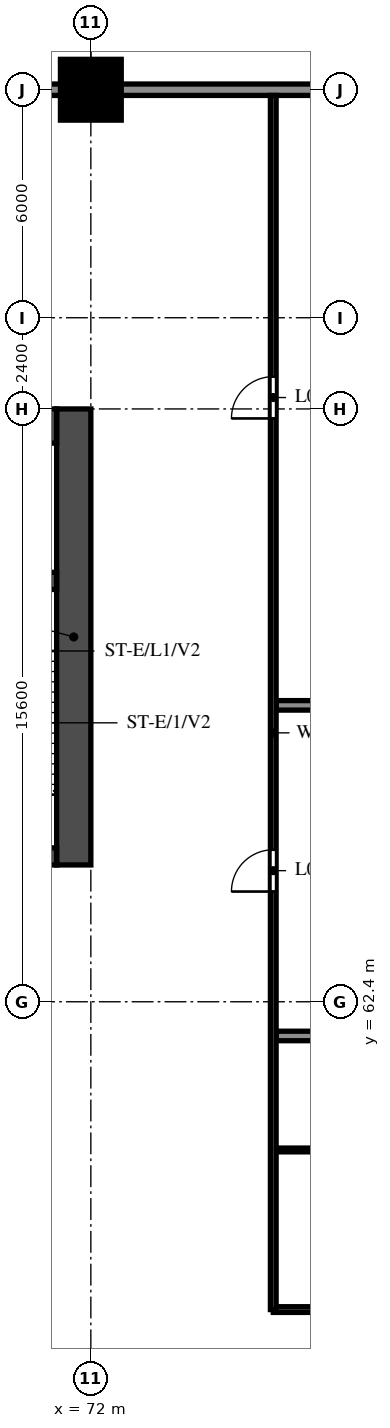
"""IFC4 building model, lengths in metres.
Left out: names, types, materials, properties, quantities, classifications, styles, units other than length and angle.
Written with IfcOpenShell. Run it as: python <this file> out.ifc"""

import sys

from ifc_helpers import new_model, si_unit, direction, frame, frame_2d, origin, origin_2d, place, context, subcontext, project, spatial, rectangle, circle, extrude, source, transform, mapped, element, fill, save


model = new_model("IFC4")
c1 = context("Model", 3, precision=1e-05, world=origin(), true_north=direction((0.0, 1.0)))
c2 = subcontext(c1, "Body", "Model", "MODEL_VIEW")
j1 = project(units=[si_unit("LENGTHUNIT", "METRE"), si_unit("PLANEANGLEUNIT", "RADIAN")], contexts=[c1])
p1 = place(None, origin())
s1 = spatial("IfcSite", under=j1, at=p1, CompositionType="ELEMENT")
p2 = place(p1, origin())
s2 = spatial("IfcBuilding", under=s1, at=p2, CompositionType="ELEMENT")
p3 = place(p2, frame((0.0, 0.0, 7.8)))
s3 = spatial("IfcBuildingStorey", under=s2, at=p3, CompositionType="ELEMENT", Elevation=7.8)
m1 = source(origin(), c2, "Body", "SweptSolid", [
    extrude(circle(Radius=0.8, at=origin_2d()), origin(), (0.0, 0.0, 1.0), 5.0),
])
p4 = place(p3, frame((72.0, 86.4, 0.0), z_axis=(0.0, 0.0, 1.0), x_axis=(1.0, 0.0, 0.0)))
e1 = element("IfcColumn", 1, at=p4, inside=s3, PredefinedType="COLUMN", context=c2, shape_type="MappedRepresentation", body=[
    mapped(m1, transform((0.0, 0.0, 0.0))),
])
p5 = place(p3, frame((71.55, 66.0, 0.0), z_axis=(0.0, 0.0, 1.0), x_axis=(0.0, 1.0, 0.0)))
e2 = element("IfcWall", 2, at=p5, inside=s3, PredefinedType="SHEAR", context=c2, shape_type="SweptSolid", body=[
    extrude(rectangle(XDim=12.0, YDim=0.9, at=frame_2d((6.0, 0.0))), origin(), (0.0, 0.0, 1.0), 5.0),
])
p6 = place(p3, frame((29.7, 77.55, 0.0), z_axis=(0.0, 0.0, 1.0), x_axis=(1.0, 0.0, 0.0)))
e3 = element("IfcWall", 3, at=p6, inside=s3, PredefinedType="SHEAR", context=c2, shape_type="SweptSolid", body=[
    extrude(rectangle(XDim=41.4, YDim=0.9, at=frame_2d((20.7, 0.0))), origin(), (0.0, 0.0, 1.0), 5.0),
])
p7 = place(p3, frame((29.7, 66.225, 0.0), z_axis=(0.0, 0.0, 1.0), x_axis=(1.0, 0.0, 0.0)))
e4 = element("IfcWall", 4, at=p7, inside=s3, PredefinedType="SHEAR", context=c2, shape_type="SweptSolid", body=[
    extrude(rectangle(XDim=41.4, YDim=0.45, at=frame_2d((20.7, 0.0))), origin(), (0.0, 0.0, 1.0), 5.0),
])
p8 = place(p7, frame((0.925, 0.0, 0.0)))
e5 = element("IfcOpeningElement", 5, at=p8, cuts=e4, PredefinedType="OPENING", context=c2, shape_type="SweptSolid", body=[
    extrude(rectangle(XDim=1.1, YDim=2.1, at=frame_2d((0.55, 1.05))), frame((0.0, 0.235, 0.0), z_axis=(0.0, -1.0, 0.0), x_axis=(1.0, 0.0, 0.0)), (0.0, 0.0, 1.0), 0.47),
])
p9 = place(p7, frame((3.738, 0.0, 0.0)))
e6 = element("IfcOpeningElement", 6, at=p9, cuts=e4, PredefinedType="OPENING", context=c2, shape_type="SweptSolid", body=[
    extrude(rectangle(XDim=1.8, YDim=2.1, at=frame_2d((0.9, 1.05))), frame((0.0, 0.235, 0.0), z_axis=(0.0, -1.0, 0.0), x_axis=(1.0, 0.0, 0.0)), (0.0, 0.0, 1.0), 0.47),
])
p10 = place(p3, frame((67.925, 73.475, 0.0), z_axis=(0.0, 0.0, 1.0), x_axis=(1.0, 0.0, 0.0)))
e7 = element("IfcWall", 7, at=p10, inside=s3, PredefinedType="SHEAR", context=c2, shape_type="SweptSolid", body=[
    extrude(rectangle(XDim=3.175, YDim=0.45, at=frame_2d((1.587, 0.0))), origin(), (0.0, 0.0, 1.0), 5.0),
])
p11 = place(p3, frame((76.8, 54.3, 0.0), z_axis=(0.0, 0.0, 1.0), x_axis=(1.0, 0.0, 0.0)))
e8 = element("IfcWall", 8, at=p11, inside=s3, PredefinedType="PARTITIONING", context=c2, shape_type="SweptSolid", body=[
    extrude(rectangle(XDim=19.75, YDim=0.15, at=frame_2d((9.875, 0.0))), origin(), (0.0, 0.0, 1.0), 3.8),
])
p12 = place(p11, frame((6.65, 0.0, 0.0)))
e9 = element("IfcOpeningElement", 9, at=p12, cuts=e8, PredefinedType="OPENING", context=c2, shape_type="SweptSolid", body=[
    extrude(rectangle(XDim=1.1, YDim=2.1, at=frame_2d((0.55, 1.05))), frame((0.0, 0.085, 0.0), z_axis=(0.0, -1.0, 0.0), x_axis=(1.0, 0.0, 0.0)), (0.0, 0.0, 1.0), 0.17),
])
p13 = place(p3, frame((76.875, 58.5, 0.0), z_axis=(0.0, 0.0, 1.0), x_axis=(1.0, 0.0, 0.0)))
e10 = element("IfcWall", 10, at=p13, inside=s3, PredefinedType="PARTITIONING", context=c2, shape_type="SweptSolid", body=[
    extrude(rectangle(XDim=4.675, YDim=0.1, at=frame_2d((2.337, 0.0))), origin(), (0.0, 0.0, 1.0), 3.8),
])
p14 = place(p3, frame((76.875, 61.5, 0.0), z_axis=(0.0, 0.0, 1.0), x_axis=(1.0, 0.0, 0.0)))
e11 = element("IfcWall", 11, at=p14, inside=s3, PredefinedType="SOLIDWALL", context=c2, shape_type="SweptSolid", body=[
    extrude(rectangle(XDim=14.325, YDim=0.25, at=frame_2d((7.163, 0.0))), origin(), (0.0, 0.0, 1.0), 3.8),
])
p15 = place(p3, frame((76.875, 70.2, 0.0), z_axis=(0.0, 0.0, 1.0), x_axis=(1.0, 0.0, 0.0)))
e12 = element("IfcWall", 12, at=p15, inside=s3, PredefinedType="SOLIDWALL", context=c2, shape_type="SweptSolid", body=[
    extrude(rectangle(XDim=23.775, YDim=0.25, at=frame_2d((11.887, 0.0))), origin(), (0.0, 0.0, 1.0), 3.8),
])
p16 = place(p3, frame((0.0, 86.4, 0.0), z_axis=(0.0, 0.0, 1.0), x_axis=(1.0, 0.0, 0.0)))
e13 = element("IfcWall", 13, at=p16, inside=s3, PredefinedType="SOLIDWALL", context=c2, shape_type="SweptSolid", body=[
    extrude(rectangle(XDim=100.8, YDim=0.3, at=frame_2d((50.4, 0.0))), origin(), (0.0, 0.0, 1.0), 5.0),
])
p17 = place(p16, frame((2.4, 0.0, 0.6)))
e14 = element("IfcOpeningElement", 14, at=p17, cuts=e13, PredefinedType="OPENING", context=c2, shape_type="SweptSolid", body=[
    extrude(rectangle(XDim=1.8, YDim=2.4, at=frame_2d((0.9, 1.2))), frame((0.0, 0.16, 0.0), z_axis=(0.0, -1.0, 0.0), x_axis=(1.0, 0.0, 0.0)), (0.0, 0.0, 1.0), 0.32),
])
p18 = place(p16, frame((6.0, 0.0, 0.6)))
e15 = element("IfcOpeningElement", 15, at=p18, cuts=e13, PredefinedType="OPENING", context=c2, shape_type="SweptSolid", body=[
    extrude(rectangle(XDim=1.8, YDim=2.4, at=frame_2d((0.9, 1.2))), frame((0.0, 0.16, 0.0), z_axis=(0.0, -1.0, 0.0), x_axis=(1.0, 0.0, 0.0)), (0.0, 0.0, 1.0), 0.32),
])
p19 = place(p16, frame((9.6, 0.0, 0.6)))
e16 = element("IfcOpeningElement", 16, at=p19, cuts=e13, PredefinedType="OPENING", context=c2, shape_type="SweptSolid", body=[
    extrude(rectangle(XDim=1.8, YDim=2.4, at=frame_2d((0.9, 1.2))), frame((0.0, 0.16, 0.0), z_axis=(0.0, -1.0, 0.0), x_axis=(1.0, 0.0, 0.0)), (0.0, 0.0, 1.0), 0.32),
])
p20 = place(p16, frame((16.8, 0.0, 0.6)))
e17 = element("IfcOpeningElement", 17, at=p20, cuts=e13, PredefinedType="OPENING", context=c2, shape_type="SweptSolid", body=[
    extrude(rectangle(XDim=1.8, YDim=2.4, at=frame_2d((0.9, 1.2))), frame((0.0, 0.16, 0.0), z_axis=(0.0, -1.0, 0.0), x_axis=(1.0, 0.0, 0.0)), (0.0, 0.0, 1.0), 0.32),
])
p21 = place(p16, frame((20.4, 0.0, 0.6)))
e18 = element("IfcOpeningElement", 18, at=p21, cuts=e13, PredefinedType="OPENING", context=c2, shape_type="SweptSolid", body=[
    extrude(rectangle(XDim=1.8, YDim=2.4, at=frame_2d((0.9, 1.2))), frame((0.0, 0.16, 0.0), z_axis=(0.0, -1.0, 0.0), x_axis=(1.0, 0.0, 0.0)), (0.0, 0.0, 1.0), 0.32),
])
p22 = place(p16, frame((78.0, 0.0, 0.6)))
e19 = element("IfcOpeningElement", 19, at=p22, cuts=e13, PredefinedType="OPENING", context=c2, shape_type="SweptSolid", body=[
    extrude(rectangle(XDim=1.8, YDim=2.4, at=frame_2d((0.9, 1.2))), frame((0.0, 0.16, 0.0), z_axis=(0.0, -1.0, 0.0), x_axis=(1.0, 0.0, 0.0)), (0.0, 0.0, 1.0), 0.32),
])
p23 = place(p16, frame((81.6, 0.0, 0.6)))
e20 = element("IfcOpeningElement", 20, at=p23, cuts=e13, PredefinedType="OPENING", context=c2, shape_type="SweptSolid", body=[
    extrude(rectangle(XDim=1.8, YDim=2.4, at=frame_2d((0.9, 1.2))), frame((0.0, 0.16, 0.0), z_axis=(0.0, -1.0, 0.0), x_axis=(1.0, 0.0, 0.0)), (0.0, 0.0, 1.0), 0.32),
])
p24 = place(p16, frame((88.8, 0.0, 0.6)))
e21 = element("IfcOpeningElement", 21, at=p24, cuts=e13, PredefinedType="OPENING", context=c2, shape_type="SweptSolid", body=[
    extrude(rectangle(XDim=1.8, YDim=2.4, at=frame_2d((0.9, 1.2))), frame((0.0, 0.16, 0.0), z_axis=(0.0, -1.0, 0.0), x_axis=(1.0, 0.0, 0.0)), (0.0, 0.0, 1.0), 0.32),
])
p25 = place(p16, frame((92.4, 0.0, 0.6)))
e22 = element("IfcOpeningElement", 22, at=p25, cuts=e13, PredefinedType="OPENING", context=c2, shape_type="SweptSolid", body=[
    extrude(rectangle(XDim=1.8, YDim=2.4, at=frame_2d((0.9, 1.2))), frame((0.0, 0.16, 0.0), z_axis=(0.0, -1.0, 0.0), x_axis=(1.0, 0.0, 0.0)), (0.0, 0.0, 1.0), 0.32),
])
p26 = place(p16, frame((96.0, 0.0, 0.6)))
e23 = element("IfcOpeningElement", 23, at=p26, cuts=e13, PredefinedType="OPENING", context=c2, shape_type="SweptSolid", body=[
    extrude(rectangle(XDim=1.8, YDim=2.4, at=frame_2d((0.9, 1.2))), frame((0.0, 0.16, 0.0), z_axis=(0.0, -1.0, 0.0), x_axis=(1.0, 0.0, 0.0)), (0.0, 0.0, 1.0), 0.32),
])
p27 = place(p3, frame((76.8, 54.3, 0.0), z_axis=(0.0, 0.0, 1.0), x_axis=(0.0, 1.0, 0.0)))
e24 = element("IfcWall", 24, at=p27, inside=s3, PredefinedType="PARTITIONING", context=c2, shape_type="SweptSolid", body=[
    extrude(rectangle(XDim=31.95, YDim=0.15, at=frame_2d((15.975, 0.0))), origin(), (0.0, 0.0, 1.0), 3.8),
])
p28 = place(p27, frame((11.0, 0.0, 0.0)))
e25 = element("IfcOpeningElement", 25, at=p28, cuts=e24, PredefinedType="OPENING", context=c2, shape_type="SweptSolid", body=[
    extrude(rectangle(XDim=1.1, YDim=2.1, at=frame_2d((0.55, 1.05))), frame((0.0, 0.085, 0.0), z_axis=(0.0, -1.0, 0.0), x_axis=(1.0, 0.0, 0.0)), (0.0, 0.0, 1.0), 0.17),
])
p29 = place(p27, frame((23.45, 0.0, 0.0)))
e26 = element("IfcOpeningElement", 26, at=p29, cuts=e24, PredefinedType="OPENING", context=c2, shape_type="SweptSolid", body=[
    extrude(rectangle(XDim=1.1, YDim=2.1, at=frame_2d((0.55, 1.05))), frame((0.0, 0.085, 0.0), z_axis=(0.0, -1.0, 0.0), x_axis=(1.0, 0.0, 0.0)), (0.0, 0.0, 1.0), 0.17),
])
p30 = place(p28, origin())
e27 = element("IfcDoor", 27, at=p30, inside=s3, OperationType="SINGLE_SWING_LEFT", PredefinedType="DOOR", context=c2, shape_type="SweptSolid", body=[
    extrude(rectangle(XDim=1.1, YDim=2.1, at=frame_2d((0.55, 1.05))), frame((0.0, 0.025, 0.0), z_axis=(0.0, -1.0, 0.0), x_axis=(1.0, 0.0, 0.0)), (0.0, 0.0, 1.0), 0.05),
])
fill(e25, e27)
p31 = place(p29, origin())
e28 = element("IfcDoor", 28, at=p31, inside=s3, OperationType="SINGLE_SWING_RIGHT", PredefinedType="DOOR", context=c2, shape_type="SweptSolid", body=[
    extrude(rectangle(XDim=1.1, YDim=2.1, at=frame_2d((0.55, 1.05))), frame((0.0, 0.025, 0.0), z_axis=(0.0, -1.0, 0.0), x_axis=(1.0, 0.0, 0.0)), (0.0, 0.0, 1.0), 0.05),
])
fill(e26, e28)
save(model, sys.argv[1])
